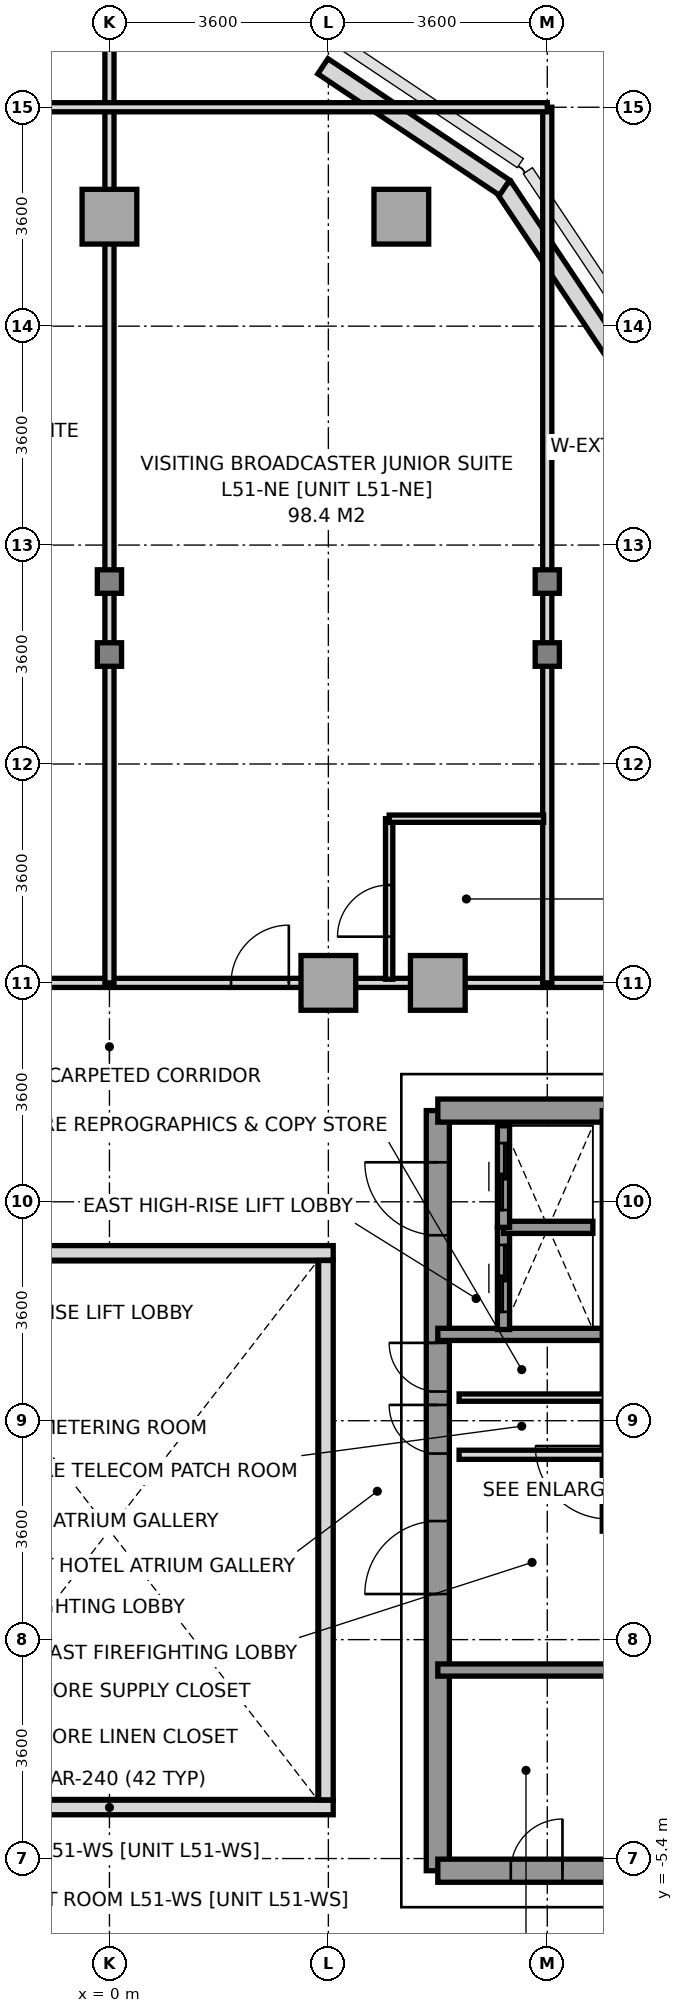
"""IFC4 building model, lengths in metres.
Left out: names, types, materials, properties, quantities, classifications, styles, units other than length and angle.
Written with IfcOpenShell. Run it as: python <this file> out.ifc"""

import sys

from ifc_helpers import new_model, si_unit, direction, frame, frame_2d, origin, origin_2d, place, context, subcontext, project, spatial, rectangle, i_section, extrude, source, transform, mapped, element, fill, save


model = new_model("IFC4")
c1 = context("Model", 3, precision=1e-05, world=origin(), true_north=direction((0.0, 1.0)))
c2 = subcontext(c1, "Body", "Model", "MODEL_VIEW")
j1 = project(units=[si_unit("LENGTHUNIT", "METRE"), si_unit("PLANEANGLEUNIT", "RADIAN")], contexts=[c1])
p1 = place(None, origin())
s1 = spatial("IfcSite", under=j1, at=p1, CompositionType="ELEMENT")
p2 = place(p1, origin())
s2 = spatial("IfcBuilding", under=s1, at=p2, CompositionType="ELEMENT")
p3 = place(p2, frame((0.0, 0.0, 187.6)))
s3 = spatial("IfcBuildingStorey", under=s2, at=p3, CompositionType="ELEMENT", Elevation=187.6)
m1 = source(origin(), c2, "Body", "SweptSolid", [
    extrude(i_section(OverallWidth=0.398, OverallDepth=0.387, WebThickness=0.018, FlangeThickness=0.028, at=origin_2d()), origin(), (0.0, 0.0, 1.0), 3.2),
])
for number, where, z_axis, x_axis in (
    (1, (0.0, 14.4, 0.0), (0.0, 0.0, 1.0), (1.0, 0.0, 0.0)),
    (2, (0.0, 15.6, 0.0), (0.0, 0.0, 1.0), (1.0, 0.0, 0.0)),
):
    element("IfcColumn", number, at=place(p3, frame(where, z_axis=z_axis, x_axis=x_axis)), inside=s3, PredefinedType="COLUMN", context=c2, shape_type="MappedRepresentation", body=[
        mapped(m1, transform((0.0, 0.0, 0.0), x_axis=(1.0, 0.0, 0.0), y_axis=(0.0, 1.0, 0.0), z_axis=(0.0, 0.0, 1.0), scale=1.0)),
    ])
m2 = source(origin(), c2, "Body", "SweptSolid", [
    extrude(rectangle(XDim=0.9, YDim=0.9, at=origin_2d()), origin(), (0.0, 0.0, 1.0), 3.2),
])
for number, where, z_axis, x_axis in (
    (3, (0.0, 21.6, 0.0), (0.0, 0.0, 1.0), (1.0, 0.0, 0.0)),
    (4, (3.6, 9.0, 0.0), (0.0, 0.0, 1.0), (1.0, 0.0, 0.0)),
    (5, (4.8, 21.6, 0.0), (0.0, 0.0, 1.0), (1.0, 0.0, 0.0)),
    (6, (5.4, 9.0, 0.0), (0.0, 0.0, 1.0), (1.0, 0.0, 0.0)),
):
    element("IfcColumn", number, at=place(p3, frame(where, z_axis=z_axis, x_axis=x_axis)), inside=s3, PredefinedType="COLUMN", context=c2, shape_type="MappedRepresentation", body=[
        mapped(m2, transform((0.0, 0.0, 0.0), x_axis=(1.0, 0.0, 0.0), y_axis=(0.0, 1.0, 0.0), z_axis=(0.0, 0.0, 1.0), scale=1.0)),
    ])
for number, where, z_axis, x_axis in (
    (7, (7.2, 14.4, 0.0), (0.0, 0.0, 1.0), (1.0, 0.0, 0.0)),
    (8, (7.2, 15.6, 0.0), (0.0, 0.0, 1.0), (1.0, 0.0, 0.0)),
):
    element("IfcColumn", number, at=place(p3, frame(where, z_axis=z_axis, x_axis=x_axis)), inside=s3, PredefinedType="COLUMN", context=c2, shape_type="MappedRepresentation", body=[
        mapped(m1, transform((0.0, 0.0, 0.0), x_axis=(1.0, 0.0, 0.0), y_axis=(0.0, 1.0, 0.0), z_axis=(0.0, 0.0, 1.0), scale=1.0)),
    ])
p4 = place(p3, frame((8.482, 19.097, 0.0), z_axis=(0.0, 0.0, 1.0), x_axis=(-0.555574187116, 0.831466970246, 0.0)))
e9 = element("IfcWall", 9, at=p4, inside=s3, PredefinedType="SOLIDWALL", context=c2, shape_type="SweptSolid", body=[
    extrude(rectangle(XDim=3.609, YDim=0.3, at=frame_2d((1.804, 0.0))), origin(), (0.0, 0.0, 1.0), 3.2),
])
p5 = place(p3, frame((6.498, 22.077, 0.0), z_axis=(0.0, 0.0, 1.0), x_axis=(-0.8314749531, 0.555562239868, 0.0)))
e10 = element("IfcWall", 10, at=p5, inside=s3, PredefinedType="SOLIDWALL", context=c2, shape_type="SweptSolid", body=[
    extrude(rectangle(XDim=3.593, YDim=0.3, at=frame_2d((1.797, 0.0))), origin(), (0.0, 0.0, 1.0), 3.2),
])
p6 = place(p3, frame((5.4, -5.6, 0.0), z_axis=(0.0, 0.0, 1.0), x_axis=(0.0, 1.0, 0.0)))
e11 = element("IfcWall", 11, at=p6, inside=s3, PredefinedType="SHEAR", context=c2, shape_type="SweptSolid", body=[
    extrude(rectangle(XDim=12.5, YDim=0.38, at=frame_2d((6.25, 0.0))), origin(), (0.0, 0.0, 1.0), 3.2),
])
p7 = place(p6, frame((4.55, 0.0, 0.0)))
e12 = element("IfcOpeningElement", 12, at=p7, cuts=e11, PredefinedType="OPENING", context=c2, shape_type="SweptSolid", body=[
    extrude(rectangle(XDim=1.2, YDim=2.2, at=frame_2d((0.6, 1.1))), frame((0.0, 0.2, 0.0), z_axis=(0.0, -1.0, 0.0), x_axis=(1.0, 0.0, 0.0)), (0.0, 0.0, 1.0), 0.4),
])
p8 = place(p6, frame((10.45, 0.0, 0.0)))
e13 = element("IfcOpeningElement", 13, at=p8, cuts=e11, PredefinedType="OPENING", context=c2, shape_type="SweptSolid", body=[
    extrude(rectangle(XDim=1.2, YDim=2.2, at=frame_2d((0.6, 1.1))), frame((0.0, 0.2, 0.0), z_axis=(0.0, -1.0, 0.0), x_axis=(1.0, 0.0, 0.0)), (0.0, 0.0, 1.0), 0.4),
])
p9 = place(p6, frame((6.86, 0.0, 0.0)))
e14 = element("IfcOpeningElement", 14, at=p9, cuts=e11, PredefinedType="OPENING", context=c2, shape_type="SweptSolid", body=[
    extrude(rectangle(XDim=0.8, YDim=2.1, at=frame_2d((0.4, 1.05))), frame((0.0, 0.2, 0.0), z_axis=(0.0, -1.0, 0.0), x_axis=(1.0, 0.0, 0.0)), (0.0, 0.0, 1.0), 0.4),
])
p10 = place(p6, frame((7.88, 0.0, 0.0)))
e15 = element("IfcOpeningElement", 15, at=p10, cuts=e11, PredefinedType="OPENING", context=c2, shape_type="SweptSolid", body=[
    extrude(rectangle(XDim=0.8, YDim=2.1, at=frame_2d((0.4, 1.05))), frame((0.0, 0.2, 0.0), z_axis=(0.0, -1.0, 0.0), x_axis=(1.0, 0.0, 0.0)), (0.0, 0.0, 1.0), 0.4),
])
p11 = place(p3, frame((5.4, 6.9, 0.0), z_axis=(0.0, 0.0, 1.0), x_axis=(1.0, 0.0, 0.0)))
e16 = element("IfcWall", 16, at=p11, inside=s3, PredefinedType="SHEAR", context=c2, shape_type="SweptSolid", body=[
    extrude(rectangle(XDim=5.956, YDim=0.38, at=frame_2d((2.978, 0.0))), origin(), (0.0, 0.0, 1.0), 3.2),
])
p12 = place(p3, frame((5.4, -5.6, 0.0), z_axis=(0.0, 0.0, 1.0), x_axis=(1.0, 0.0, 0.0)))
e17 = element("IfcWall", 17, at=p12, inside=s3, PredefinedType="SHEAR", context=c2, shape_type="SweptSolid", body=[
    extrude(rectangle(XDim=7.8, YDim=0.38, at=frame_2d((3.9, 0.0))), origin(), (0.0, 0.0, 1.0), 3.2),
])
p13 = place(p12, frame((5.85, 0.0, 0.0)))
e18 = element("IfcOpeningElement", 18, at=p13, cuts=e17, PredefinedType="OPENING", context=c2, shape_type="SweptSolid", body=[
    extrude(rectangle(XDim=0.8, YDim=2.1, at=frame_2d((0.4, 1.05))), frame((0.0, 0.2, 0.0), z_axis=(0.0, -1.0, 0.0), x_axis=(1.0, 0.0, 0.0)), (0.0, 0.0, 1.0), 0.4),
])
p14 = place(p12, frame((1.2, 0.0, 0.0)))
e19 = element("IfcOpeningElement", 19, at=p14, cuts=e17, PredefinedType="OPENING", context=c2, shape_type="SweptSolid", body=[
    extrude(rectangle(XDim=0.85, YDim=2.1, at=frame_2d((0.425, 1.05))), frame((0.0, 0.2, 0.0), z_axis=(0.0, -1.0, 0.0), x_axis=(1.0, 0.0, 0.0)), (0.0, 0.0, 1.0), 0.4),
])
p15 = place(p12, frame((3.4, 0.0, 0.0)))
e20 = element("IfcOpeningElement", 20, at=p15, cuts=e17, PredefinedType="OPENING", context=c2, shape_type="SweptSolid", body=[
    extrude(rectangle(XDim=0.85, YDim=2.1, at=frame_2d((0.425, 1.05))), frame((0.0, 0.2, 0.0), z_axis=(0.0, -1.0, 0.0), x_axis=(1.0, 0.0, 0.0)), (0.0, 0.0, 1.0), 0.4),
])
p16 = place(p3, frame((5.4, 3.22, 0.0), z_axis=(0.0, 0.0, 1.0), x_axis=(1.0, 0.0, 0.0)))
e21 = element("IfcWall", 21, at=p16, inside=s3, PredefinedType="SOLIDWALL", context=c2, shape_type="SweptSolid", body=[
    extrude(rectangle(XDim=2.78, YDim=0.2, at=frame_2d((1.39, 0.0))), origin(), (0.0, 0.0, 1.0), 3.2),
])
p17 = place(p3, frame((5.4, -2.3, 0.0), z_axis=(0.0, 0.0, 1.0), x_axis=(1.0, 0.0, 0.0)))
e22 = element("IfcWall", 22, at=p17, inside=s3, PredefinedType="SOLIDWALL", context=c2, shape_type="SweptSolid", body=[
    extrude(rectangle(XDim=3.08, YDim=0.2, at=frame_2d((1.54, 0.0))), origin(), (0.0, 0.0, 1.0), 3.2),
])
p18 = place(p3, frame((8.204, -0.016, 0.0), z_axis=(0.0, 0.0, 1.0), x_axis=(0.0, 1.0, 0.0)))
e23 = element("IfcWall", 23, at=p18, inside=s3, PredefinedType="SOLIDWALL", context=c2, shape_type="SweptSolid", body=[
    extrude(rectangle(XDim=6.916, YDim=0.2, at=frame_2d((3.458, 0.0))), origin(), (0.0, 0.0, 1.0), 3.2),
])
p19 = place(p18, frame((0.2, 0.0, 0.0)))
e24 = element("IfcOpeningElement", 24, at=p19, cuts=e23, PredefinedType="OPENING", context=c2, shape_type="SweptSolid", body=[
    extrude(rectangle(XDim=1.2, YDim=2.2, at=frame_2d((0.6, 1.1))), frame((0.0, 0.11, 0.0), z_axis=(0.0, -1.0, 0.0), x_axis=(1.0, 0.0, 0.0)), (0.0, 0.0, 1.0), 0.22),
])
p20 = place(p3, frame((6.48, 3.3, 0.0), z_axis=(0.0, 0.0, 1.0), x_axis=(0.0, 1.0, 0.0)))
e25 = element("IfcWall", 25, at=p20, inside=s3, PredefinedType="SOLIDWALL", context=c2, shape_type="SweptSolid", body=[
    extrude(rectangle(XDim=1.68, YDim=0.2, at=frame_2d((0.84, 0.0))), origin(), (0.0, 0.0, 1.0), 3.2),
])
p21 = place(p20, frame((0.29, 0.0, 0.0)))
e26 = element("IfcOpeningElement", 26, at=p21, cuts=e25, PredefinedType="OPENING", context=c2, shape_type="SweptSolid", body=[
    extrude(rectangle(XDim=1.1, YDim=2.2, at=frame_2d((0.55, 1.1))), frame((0.0, 0.11, 0.0), z_axis=(0.0, -1.0, 0.0), x_axis=(1.0, 0.0, 0.0)), (0.0, 0.0, 1.0), 0.22),
])
p22 = place(p3, frame((6.48, 4.98, 0.0), z_axis=(0.0, 0.0, 1.0), x_axis=(1.0, 0.0, 0.0)))
e27 = element("IfcWall", 27, at=p22, inside=s3, PredefinedType="SOLIDWALL", context=c2, shape_type="SweptSolid", body=[
    extrude(rectangle(XDim=1.47, YDim=0.2, at=frame_2d((0.735, 0.0))), origin(), (0.0, 0.0, 1.0), 3.2),
])
p23 = place(p3, frame((6.48, 4.98, 0.0), z_axis=(0.0, 0.0, 1.0), x_axis=(0.0, 1.0, 0.0)))
e28 = element("IfcWall", 28, at=p23, inside=s3, PredefinedType="SOLIDWALL", context=c2, shape_type="SweptSolid", body=[
    extrude(rectangle(XDim=1.67, YDim=0.2, at=frame_2d((0.835, 0.0))), origin(), (0.0, 0.0, 1.0), 3.2),
])
p24 = place(p23, frame((0.285, 0.0, 0.0)))
e29 = element("IfcOpeningElement", 29, at=p24, cuts=e28, PredefinedType="OPENING", context=c2, shape_type="SweptSolid", body=[
    extrude(rectangle(XDim=1.1, YDim=2.2, at=frame_2d((0.55, 1.1))), frame((0.0, 0.11, 0.0), z_axis=(0.0, -1.0, 0.0), x_axis=(1.0, 0.0, 0.0)), (0.0, 0.0, 1.0), 0.22),
])
p25 = place(p3, frame((5.75, 1.24, 0.0), z_axis=(0.0, 0.0, 1.0), x_axis=(1.0, 0.0, 0.0)))
e30 = element("IfcWall", 30, at=p25, inside=s3, PredefinedType="PARTITIONING", context=c2, shape_type="SweptSolid", body=[
    extrude(rectangle(XDim=2.39, YDim=0.15, at=frame_2d((1.195, 0.0))), origin(), (0.0, 0.0, 1.0), 2.3),
])
p26 = place(p3, frame((5.75, 2.18, 0.0), z_axis=(0.0, 0.0, 1.0), x_axis=(1.0, 0.0, 0.0)))
e31 = element("IfcWall", 31, at=p26, inside=s3, PredefinedType="PARTITIONING", context=c2, shape_type="SweptSolid", body=[
    extrude(rectangle(XDim=2.39, YDim=0.12, at=frame_2d((1.195, 0.0))), origin(), (0.0, 0.0, 1.0), 2.3),
])
p27 = place(p3, frame((-9.55, 9.0, 0.0), z_axis=(0.0, 0.0, 1.0), x_axis=(1.0, 0.0, 0.0)))
e32 = element("IfcWall", 32, at=p27, inside=s3, PredefinedType="PARTITIONING", context=c2, shape_type="SweptSolid", body=[
    extrude(rectangle(XDim=19.1, YDim=0.15, at=frame_2d((9.55, 0.0))), origin(), (0.0, 0.0, 1.0), 2.75),
])
p28 = place(p27, frame((0.7, 0.0, 0.0)))
e33 = element("IfcOpeningElement", 33, at=p28, cuts=e32, PredefinedType="OPENING", context=c2, shape_type="SweptSolid", body=[
    extrude(rectangle(XDim=0.95, YDim=2.15, at=frame_2d((0.475, 1.075))), frame((0.0, 0.085, 0.0), z_axis=(0.0, -1.0, 0.0), x_axis=(1.0, 0.0, 0.0)), (0.0, 0.0, 1.0), 0.17),
])
p29 = place(p27, frame((7.15, 0.0, 0.0)))
e34 = element("IfcOpeningElement", 34, at=p29, cuts=e32, PredefinedType="OPENING", context=c2, shape_type="SweptSolid", body=[
    extrude(rectangle(XDim=0.95, YDim=2.15, at=frame_2d((0.475, 1.075))), frame((0.0, 0.085, 0.0), z_axis=(0.0, -1.0, 0.0), x_axis=(1.0, 0.0, 0.0)), (0.0, 0.0, 1.0), 0.17),
])
p30 = place(p27, frame((11.55, 0.0, 0.0)))
e35 = element("IfcOpeningElement", 35, at=p30, cuts=e32, PredefinedType="OPENING", context=c2, shape_type="SweptSolid", body=[
    extrude(rectangle(XDim=0.95, YDim=2.15, at=frame_2d((0.475, 1.075))), frame((0.0, 0.085, 0.0), z_axis=(0.0, -1.0, 0.0), x_axis=(1.0, 0.0, 0.0)), (0.0, 0.0, 1.0), 0.17),
])
p31 = place(p3, frame((0.0, 9.0, 0.0), z_axis=(0.0, 0.0, 1.0), x_axis=(0.0, 1.0, 0.0)))
e36 = element("IfcWall", 36, at=p31, inside=s3, PredefinedType="PARTITIONING", context=c2, shape_type="SweptSolid", body=[
    extrude(rectangle(XDim=15.65, YDim=0.15, at=frame_2d((7.825, 0.0))), origin(), (0.0, 0.0, 1.0), 2.75),
])
p32 = place(p3, frame((7.2, 9.0, 0.0), z_axis=(0.0, 0.0, 1.0), x_axis=(0.0, 1.0, 0.0)))
e37 = element("IfcWall", 37, at=p32, inside=s3, PredefinedType="PARTITIONING", context=c2, shape_type="SweptSolid", body=[
    extrude(rectangle(XDim=14.4, YDim=0.15, at=frame_2d((7.2, 0.0))), origin(), (0.0, 0.0, 1.0), 2.75),
])
p33 = place(p3, frame((-7.2, 23.4, 0.0), z_axis=(0.0, 0.0, 1.0), x_axis=(1.0, 0.0, 0.0)))
e38 = element("IfcWall", 38, at=p33, inside=s3, PredefinedType="PARTITIONING", context=c2, shape_type="SweptSolid", body=[
    extrude(rectangle(XDim=14.4, YDim=0.15, at=frame_2d((7.2, 0.0))), origin(), (0.0, 0.0, 1.0), 3.2),
])
p34 = place(p3, frame((4.6, 9.06, 0.0), z_axis=(0.0, 0.0, 1.0), x_axis=(0.0, 1.0, 0.0)))
e39 = element("IfcWall", 39, at=p34, inside=s3, PredefinedType="PARTITIONING", context=c2, shape_type="SweptSolid", body=[
    extrude(rectangle(XDim=2.64, YDim=0.12, at=frame_2d((1.32, 0.0))), origin(), (0.0, 0.0, 1.0), 3.2),
])
p35 = place(p34, frame((0.7, 0.0, 0.0)))
e40 = element("IfcOpeningElement", 40, at=p35, cuts=e39, PredefinedType="OPENING", context=c2, shape_type="SweptSolid", body=[
    extrude(rectangle(XDim=0.85, YDim=2.1, at=frame_2d((0.425, 1.05))), frame((0.0, 0.07, 0.0), z_axis=(0.0, -1.0, 0.0), x_axis=(1.0, 0.0, 0.0)), (0.0, 0.0, 1.0), 0.14),
])
p36 = place(p3, frame((4.6, 11.7, 0.0), z_axis=(0.0, 0.0, 1.0), x_axis=(1.0, 0.0, 0.0)))
e41 = element("IfcWall", 41, at=p36, inside=s3, PredefinedType="PARTITIONING", context=c2, shape_type="SweptSolid", body=[
    extrude(rectangle(XDim=2.54, YDim=0.12, at=frame_2d((1.27, 0.0))), origin(), (0.0, 0.0, 1.0), 3.2),
])
for number, where, z_axis, x_axis in (
    (42, (-3.68, -4.56, 0.0), (0.0, 0.0, 1.0), (1.0, 0.0, 0.0)),
    (43, (-3.68, 4.56, 0.0), (0.0, 0.0, 1.0), (1.0, 0.0, 0.0)),
):
    element("IfcWall", number, at=place(p3, frame(where, z_axis=z_axis, x_axis=x_axis)), inside=s3, PredefinedType="PARAPET", context=c2, shape_type="SweptSolid", body=[
        extrude(rectangle(XDim=7.36, YDim=0.24, at=frame_2d((3.68, 0.0))), origin(), (0.0, 0.0, 1.0), 1.15),
    ])
p37 = place(p3, frame((3.56, -4.435, 0.0), z_axis=(0.0, 0.0, 1.0), x_axis=(0.0, 1.0, 0.0)))
e44 = element("IfcWall", 44, at=p37, inside=s3, PredefinedType="PARAPET", context=c2, shape_type="SweptSolid", body=[
    extrude(rectangle(XDim=8.87, YDim=0.24, at=frame_2d((4.435, 0.0))), origin(), (0.0, 0.0, 1.0), 1.15),
])
m3 = source(origin(), c2, "Body", "SweptSolid", [
    extrude(rectangle(XDim=1.2, YDim=2.2, at=frame_2d((0.6, 1.1))), frame((0.0, 0.025, 0.0), z_axis=(0.0, -1.0, 0.0), x_axis=(1.0, 0.0, 0.0)), (0.0, 0.0, 1.0), 0.05),
])
p38 = place(p7, origin())
e45 = element("IfcDoor", 45, at=p38, inside=s3, OperationType="SINGLE_SWING_LEFT", PredefinedType="DOOR", context=c2, shape_type="MappedRepresentation", body=[
    mapped(m3, transform((0.0, 0.0, 0.0), x_axis=(1.0, 0.0, 0.0), y_axis=(0.0, 1.0, 0.0), z_axis=(0.0, 0.0, 1.0), scale=1.0)),
])
fill(e12, e45)
p39 = place(p8, origin())
e46 = element("IfcDoor", 46, at=p39, inside=s3, OperationType="SINGLE_SWING_RIGHT", PredefinedType="DOOR", context=c2, shape_type="MappedRepresentation", body=[
    mapped(m3, transform((0.0, 0.0, 0.0), x_axis=(1.0, 0.0, 0.0), y_axis=(0.0, 1.0, 0.0), z_axis=(0.0, 0.0, 1.0), scale=1.0)),
])
fill(e13, e46)
m4 = source(origin(), c2, "Body", "SweptSolid", [
    extrude(rectangle(XDim=0.8, YDim=2.1, at=frame_2d((0.4, 1.05))), frame((0.0, 0.025, 0.0), z_axis=(0.0, -1.0, 0.0), x_axis=(1.0, 0.0, 0.0)), (0.0, 0.0, 1.0), 0.05),
])
p40 = place(p9, origin())
e47 = element("IfcDoor", 47, at=p40, inside=s3, OperationType="SINGLE_SWING_RIGHT", PredefinedType="DOOR", context=c2, shape_type="MappedRepresentation", body=[
    mapped(m4, transform((0.0, 0.0, 0.0), x_axis=(1.0, 0.0, 0.0), y_axis=(0.0, 1.0, 0.0), z_axis=(0.0, 0.0, 1.0), scale=1.0)),
])
fill(e14, e47)
p41 = place(p10, origin())
e48 = element("IfcDoor", 48, at=p41, inside=s3, OperationType="SINGLE_SWING_RIGHT", PredefinedType="DOOR", context=c2, shape_type="MappedRepresentation", body=[
    mapped(m4, transform((0.0, 0.0, 0.0), x_axis=(1.0, 0.0, 0.0), y_axis=(0.0, 1.0, 0.0), z_axis=(0.0, 0.0, 1.0), scale=1.0)),
])
fill(e15, e48)
m5 = source(origin(), c2, "Body", "SweptSolid", [
    extrude(rectangle(XDim=0.85, YDim=2.1, at=frame_2d((0.425, 1.05))), frame((0.0, 0.025, 0.0), z_axis=(0.0, -1.0, 0.0), x_axis=(1.0, 0.0, 0.0)), (0.0, 0.0, 1.0), 0.05),
])
p42 = place(p14, origin())
e49 = element("IfcDoor", 49, at=p42, inside=s3, OperationType="SINGLE_SWING_RIGHT", PredefinedType="DOOR", context=c2, shape_type="MappedRepresentation", body=[
    mapped(m5, transform((0.0, 0.0, 0.0), x_axis=(1.0, 0.0, 0.0), y_axis=(0.0, 1.0, 0.0), z_axis=(0.0, 0.0, 1.0), scale=1.0)),
])
fill(e19, e49)
m6 = source(origin(), c2, "Body", "SweptSolid", [
    extrude(rectangle(XDim=1.1, YDim=2.2, at=frame_2d((0.55, 1.1))), frame((0.0, 0.025, 0.0), z_axis=(0.0, -1.0, 0.0), x_axis=(1.0, 0.0, 0.0)), (0.0, 0.0, 1.0), 0.05),
])
p43 = place(p21, origin())
e50 = element("IfcDoor", 50, at=p43, inside=s3, OperationType="SLIDING_TO_LEFT", PredefinedType="DOOR", context=c2, shape_type="MappedRepresentation", body=[
    mapped(m6, transform((0.0, 0.0, 0.0), x_axis=(1.0, 0.0, 0.0), y_axis=(0.0, 1.0, 0.0), z_axis=(0.0, 0.0, 1.0), scale=1.0)),
])
fill(e26, e50)
p44 = place(p24, origin())
e51 = element("IfcDoor", 51, at=p44, inside=s3, OperationType="SLIDING_TO_LEFT", PredefinedType="DOOR", context=c2, shape_type="MappedRepresentation", body=[
    mapped(m6, transform((0.0, 0.0, 0.0), x_axis=(1.0, 0.0, 0.0), y_axis=(0.0, 1.0, 0.0), z_axis=(0.0, 0.0, 1.0), scale=1.0)),
])
fill(e29, e51)
p45 = place(p35, origin())
e52 = element("IfcDoor", 52, at=p45, inside=s3, OperationType="SINGLE_SWING_LEFT", PredefinedType="DOOR", context=c2, shape_type="MappedRepresentation", body=[
    mapped(m5, transform((0.0, 0.0, 0.0), x_axis=(1.0, 0.0, 0.0), y_axis=(0.0, 1.0, 0.0), z_axis=(0.0, 0.0, 1.0), scale=1.0)),
])
fill(e40, e52)
m7 = source(origin(), c2, "Body", "SweptSolid", [
    extrude(rectangle(XDim=0.95, YDim=2.15, at=frame_2d((0.475, 1.075))), frame((0.0, 0.025, 0.0), z_axis=(0.0, -1.0, 0.0), x_axis=(1.0, 0.0, 0.0)), (0.0, 0.0, 1.0), 0.05),
])
p46 = place(p30, origin())
e53 = element("IfcDoor", 53, at=p46, inside=s3, OperationType="SINGLE_SWING_RIGHT", PredefinedType="DOOR", context=c2, shape_type="MappedRepresentation", body=[
    mapped(m7, transform((0.0, 0.0, 0.0), x_axis=(1.0, 0.0, 0.0), y_axis=(0.0, 1.0, 0.0), z_axis=(0.0, 0.0, 1.0), scale=1.0)),
])
fill(e35, e53)
save(model, sys.argv[1])
